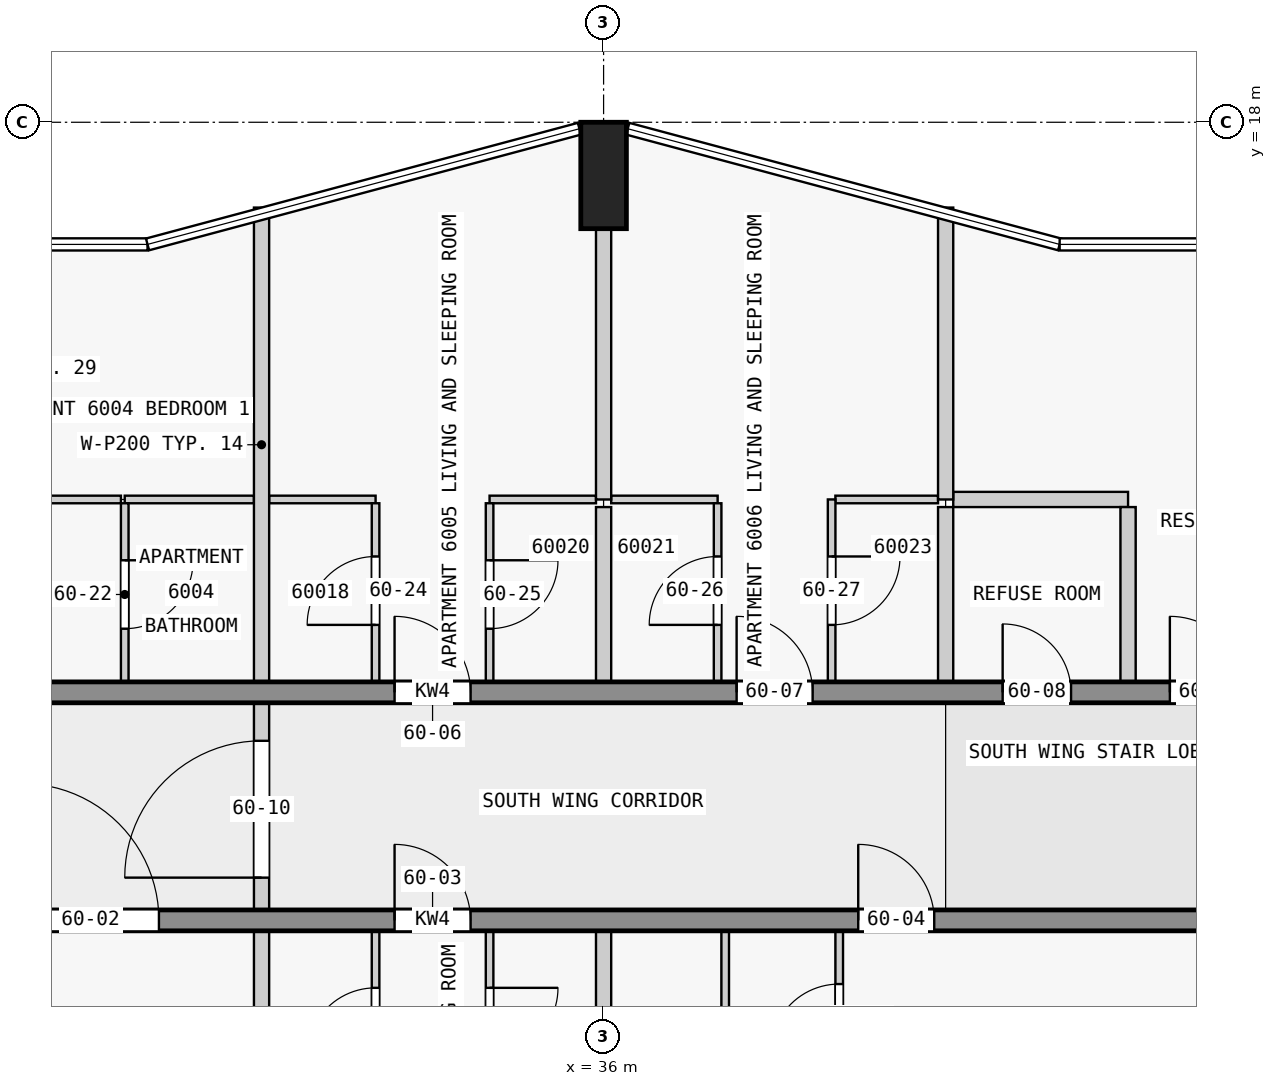
"""IFC4 building model, lengths in metres.
Left out: names, types, materials, properties, quantities, classifications, styles, units other than length and angle.
Written with IfcOpenShell. Run it as: python <this file> out.ifc"""

import sys

from ifc_helpers import new_model, si_unit, direction, frame, frame_2d, origin, origin_2d, place, context, subcontext, project, spatial, rectangle, extrude, element, fill, save


model = new_model("IFC4")
c1 = context("Model", 3, precision=1e-05, world=origin(), true_north=direction((0.0, 1.0)))
c2 = subcontext(c1, "Body", "Model", "MODEL_VIEW")
j1 = project(units=[si_unit("LENGTHUNIT", "METRE"), si_unit("PLANEANGLEUNIT", "RADIAN")], contexts=[c1])
p1 = place(None, origin())
s1 = spatial("IfcSite", under=j1, at=p1, CompositionType="ELEMENT")
p2 = place(p1, origin())
s2 = spatial("IfcBuilding", under=s1, at=p2, CompositionType="ELEMENT")
p3 = place(p2, frame((0.0, 0.0, 229.4)))
s3 = spatial("IfcBuildingStorey", under=s2, at=p3, CompositionType="ELEMENT", Elevation=229.4)
p4 = place(p3, frame((36.0, 17.3, 0.0), z_axis=(0.0, 0.0, 1.0), x_axis=(1.0, 0.0, 0.0)))
e1 = element("IfcColumn", 1, at=p4, inside=s3, PredefinedType="COLUMN", context=c2, shape_type="SweptSolid", body=[
    extrude(rectangle(XDim=0.6, YDim=1.4, at=origin_2d()), origin(), (0.0, 0.0, 1.0), 3.5),
])
p5 = place(p3, frame((22.5, 7.5, 0.0), z_axis=(0.0, 0.0, 1.0), x_axis=(1.0, 0.0, 0.0)))
e2 = element("IfcWall", 2, at=p5, inside=s3, PredefinedType="SHEAR", context=c2, shape_type="SweptSolid", body=[
    extrude(rectangle(XDim=22.5, YDim=0.275, at=frame_2d((11.25, 0.0))), origin(), (0.0, 0.0, 1.0), 3.25),
])
p6 = place(p5, frame((1.75, 0.0, 0.0)))
e3 = element("IfcOpeningElement", 3, at=p6, cuts=e2, PredefinedType="OPENING", context=c2, shape_type="SweptSolid", body=[
    extrude(rectangle(XDim=1.0, YDim=2.1, at=frame_2d((0.5, 1.05))), frame((0.0, 0.147, 0.0), z_axis=(0.0, -1.0, 0.0), x_axis=(1.0, 0.0, 0.0)), (0.0, 0.0, 1.0), 0.295),
])
p7 = place(p5, frame((5.85, 0.0, 0.0)))
e4 = element("IfcOpeningElement", 4, at=p7, cuts=e2, PredefinedType="OPENING", context=c2, shape_type="SweptSolid", body=[
    extrude(rectangle(XDim=1.8, YDim=2.1, at=frame_2d((0.9, 1.05))), frame((0.0, 0.147, 0.0), z_axis=(0.0, -1.0, 0.0), x_axis=(1.0, 0.0, 0.0)), (0.0, 0.0, 1.0), 0.295),
])
p8 = place(p5, frame((10.75, 0.0, 0.0)))
e5 = element("IfcOpeningElement", 5, at=p8, cuts=e2, PredefinedType="OPENING", context=c2, shape_type="SweptSolid", body=[
    extrude(rectangle(XDim=1.0, YDim=2.1, at=frame_2d((0.5, 1.05))), frame((0.0, 0.147, 0.0), z_axis=(0.0, -1.0, 0.0), x_axis=(1.0, 0.0, 0.0)), (0.0, 0.0, 1.0), 0.295),
])
p9 = place(p5, frame((16.85, 0.0, 0.0)))
e6 = element("IfcOpeningElement", 6, at=p9, cuts=e2, PredefinedType="OPENING", context=c2, shape_type="SweptSolid", body=[
    extrude(rectangle(XDim=1.0, YDim=2.1, at=frame_2d((0.5, 1.05))), frame((0.0, 0.147, 0.0), z_axis=(0.0, -1.0, 0.0), x_axis=(1.0, 0.0, 0.0)), (0.0, 0.0, 1.0), 0.295),
])
p10 = place(p3, frame((22.5, 10.5, 0.0), z_axis=(0.0, 0.0, 1.0), x_axis=(1.0, 0.0, 0.0)))
e7 = element("IfcWall", 7, at=p10, inside=s3, PredefinedType="SHEAR", context=c2, shape_type="SweptSolid", body=[
    extrude(rectangle(XDim=22.5, YDim=0.275, at=frame_2d((11.25, 0.0))), origin(), (0.0, 0.0, 1.0), 3.25),
])
p11 = place(p10, frame((4.05, 0.0, 0.0)))
e8 = element("IfcOpeningElement", 8, at=p11, cuts=e7, PredefinedType="OPENING", context=c2, shape_type="SweptSolid", body=[
    extrude(rectangle(XDim=1.0, YDim=2.1, at=frame_2d((0.5, 1.05))), frame((0.0, 0.147, 0.0), z_axis=(0.0, -1.0, 0.0), x_axis=(1.0, 0.0, 0.0)), (0.0, 0.0, 1.0), 0.295),
])
p12 = place(p10, frame((10.75, 0.0, 0.0)))
e9 = element("IfcOpeningElement", 9, at=p12, cuts=e7, PredefinedType="OPENING", context=c2, shape_type="SweptSolid", body=[
    extrude(rectangle(XDim=1.0, YDim=2.1, at=frame_2d((0.5, 1.05))), frame((0.0, 0.147, 0.0), z_axis=(0.0, -1.0, 0.0), x_axis=(1.0, 0.0, 0.0)), (0.0, 0.0, 1.0), 0.295),
])
p13 = place(p10, frame((15.25, 0.0, 0.0)))
e10 = element("IfcOpeningElement", 10, at=p13, cuts=e7, PredefinedType="OPENING", context=c2, shape_type="SweptSolid", body=[
    extrude(rectangle(XDim=1.0, YDim=2.1, at=frame_2d((0.5, 1.05))), frame((0.0, 0.147, 0.0), z_axis=(0.0, -1.0, 0.0), x_axis=(1.0, 0.0, 0.0)), (0.0, 0.0, 1.0), 0.295),
])
p14 = place(p10, frame((18.75, 0.0, 0.0)))
e11 = element("IfcOpeningElement", 11, at=p14, cuts=e7, PredefinedType="OPENING", context=c2, shape_type="SweptSolid", body=[
    extrude(rectangle(XDim=0.9, YDim=2.1, at=frame_2d((0.45, 1.05))), frame((0.0, 0.147, 0.0), z_axis=(0.0, -1.0, 0.0), x_axis=(1.0, 0.0, 0.0)), (0.0, 0.0, 1.0), 0.295),
])
p15 = place(p10, frame((20.95, 0.0, 0.0)))
e12 = element("IfcOpeningElement", 12, at=p15, cuts=e7, PredefinedType="OPENING", context=c2, shape_type="SweptSolid", body=[
    extrude(rectangle(XDim=1.0, YDim=2.1, at=frame_2d((0.5, 1.05))), frame((0.0, 0.147, 0.0), z_axis=(0.0, -1.0, 0.0), x_axis=(1.0, 0.0, 0.0)), (0.0, 0.0, 1.0), 0.295),
])
p16 = place(p3, frame((31.4, 13.038, 0.0), z_axis=(0.0, 0.0, 1.0), x_axis=(-1.0, 0.0, 0.0)))
e13 = element("IfcWall", 13, at=p16, inside=s3, PredefinedType="PARTITIONING", context=c2, shape_type="SweptSolid", body=[
    extrude(rectangle(XDim=1.7, YDim=0.1, at=frame_2d((0.85, 0.0))), origin(), (0.0, 0.0, 1.0), 3.25),
])
for number, where, z_axis, x_axis in (
    (14, (33.0, 13.038, 0.0), (0.0, 0.0, 1.0), (-1.0, 0.0, 0.0)),
    (15, (35.9, 13.038, 0.0), (0.0, 0.0, 1.0), (-1.0, 0.0, 0.0)),
    (16, (37.5, 13.038, 0.0), (0.0, 0.0, 1.0), (-1.0, 0.0, 0.0)),
):
    element("IfcWall", number, at=place(p3, frame(where, z_axis=z_axis, x_axis=x_axis)), inside=s3, PredefinedType="PARTITIONING", context=c2, shape_type="SweptSolid", body=[
        extrude(rectangle(XDim=1.4, YDim=0.1, at=frame_2d((0.7, 0.0))), origin(), (0.0, 0.0, 1.0), 3.25),
    ])
p17 = place(p3, frame((40.4, 13.038, 0.0), z_axis=(0.0, 0.0, 1.0), x_axis=(-1.0, 0.0, 0.0)))
e17 = element("IfcWall", 17, at=p17, inside=s3, PredefinedType="PARTITIONING", context=c2, shape_type="SweptSolid", body=[
    extrude(rectangle(XDim=1.35, YDim=0.1, at=frame_2d((0.675, 0.0))), origin(), (0.0, 0.0, 1.0), 3.25),
])
p18 = place(p3, frame((27.05, 13.038, 0.0), z_axis=(0.0, 0.0, 1.0), x_axis=(1.0, 0.0, 0.0)))
e18 = element("IfcWall", 18, at=p18, inside=s3, PredefinedType="PARTITIONING", context=c2, shape_type="SweptSolid", body=[
    extrude(rectangle(XDim=2.6, YDim=0.1, at=frame_2d((1.3, 0.0))), origin(), (0.0, 0.0, 1.0), 3.25),
])
p19 = place(p3, frame((42.9, 13.038, 0.0), z_axis=(0.0, 0.0, 1.0), x_axis=(-1.0, 0.0, 0.0)))
e19 = element("IfcWall", 19, at=p19, inside=s3, PredefinedType="PARTITIONING", context=c2, shape_type="SweptSolid", body=[
    extrude(rectangle(XDim=2.3, YDim=0.2, at=frame_2d((1.15, 0.0))), origin(), (0.0, 0.0, 1.0), 3.25),
])
p20 = place(p3, frame((29.7, 12.988, 0.0), z_axis=(0.0, 0.0, 1.0), x_axis=(0.0, -1.0, 0.0)))
e20 = element("IfcWall", 20, at=p20, inside=s3, PredefinedType="PARTITIONING", context=c2, shape_type="SweptSolid", body=[
    extrude(rectangle(XDim=2.35, YDim=0.1, at=frame_2d((1.175, 0.0))), origin(), (0.0, 0.0, 1.0), 3.25),
])
p21 = place(p20, frame((0.75, 0.0, 0.0)))
e21 = element("IfcOpeningElement", 21, at=p21, cuts=e20, PredefinedType="OPENING", context=c2, shape_type="SweptSolid", body=[
    extrude(rectangle(XDim=0.9, YDim=2.1, at=frame_2d((0.45, 1.05))), frame((0.0, 0.06, 0.0), z_axis=(0.0, -1.0, 0.0), x_axis=(1.0, 0.0, 0.0)), (0.0, 0.0, 1.0), 0.12),
])
for number, where, z_axis, x_axis in (
    (22, (31.5, 1.122, 0.0), (0.0, 0.0, 1.0), (0.0, 1.0, 0.0)),
    (23, (31.5, 10.637, 0.0), (0.0, 0.0, 1.0), (0.0, 1.0, 0.0)),
):
    element("IfcWall", number, at=place(p3, frame(where, z_axis=z_axis, x_axis=x_axis)), inside=s3, PredefinedType="PARTITIONING", context=c2, shape_type="SweptSolid", body=[
        extrude(rectangle(XDim=6.24, YDim=0.2, at=frame_2d((3.12, 0.0))), origin(), (0.0, 0.0, 1.0), 3.25),
    ])
p22 = place(p3, frame((33.0, 4.962, 0.0), z_axis=(0.0, 0.0, 1.0), x_axis=(0.0, 1.0, 0.0)))
e24 = element("IfcWall", 24, at=p22, inside=s3, PredefinedType="PARTITIONING", context=c2, shape_type="SweptSolid", body=[
    extrude(rectangle(XDim=2.4, YDim=0.1, at=frame_2d((1.2, 0.0))), origin(), (0.0, 0.0, 1.0), 3.25),
])
p23 = place(p22, frame((0.75, 0.0, 0.0)))
e25 = element("IfcOpeningElement", 25, at=p23, cuts=e24, PredefinedType="OPENING", context=c2, shape_type="SweptSolid", body=[
    extrude(rectangle(XDim=0.9, YDim=2.1, at=frame_2d((0.45, 1.05))), frame((0.0, 0.06, 0.0), z_axis=(0.0, -1.0, 0.0), x_axis=(1.0, 0.0, 0.0)), (0.0, 0.0, 1.0), 0.12),
])
p24 = place(p3, frame((33.0, 10.637, 0.0), z_axis=(0.0, 0.0, 1.0), x_axis=(0.0, 1.0, 0.0)))
e26 = element("IfcWall", 26, at=p24, inside=s3, PredefinedType="PARTITIONING", context=c2, shape_type="SweptSolid", body=[
    extrude(rectangle(XDim=2.35, YDim=0.1, at=frame_2d((1.175, 0.0))), origin(), (0.0, 0.0, 1.0), 3.25),
])
p25 = place(p24, frame((0.75, 0.0, 0.0)))
e27 = element("IfcOpeningElement", 27, at=p25, cuts=e26, PredefinedType="OPENING", context=c2, shape_type="SweptSolid", body=[
    extrude(rectangle(XDim=0.9, YDim=2.1, at=frame_2d((0.45, 1.05))), frame((0.0, 0.06, 0.0), z_axis=(0.0, -1.0, 0.0), x_axis=(1.0, 0.0, 0.0)), (0.0, 0.0, 1.0), 0.12),
])
p26 = place(p3, frame((34.5, 7.363, 0.0), z_axis=(0.0, 0.0, 1.0), x_axis=(0.0, -1.0, 0.0)))
e28 = element("IfcWall", 28, at=p26, inside=s3, PredefinedType="PARTITIONING", context=c2, shape_type="SweptSolid", body=[
    extrude(rectangle(XDim=2.35, YDim=0.1, at=frame_2d((1.175, 0.0))), origin(), (0.0, 0.0, 1.0), 3.25),
])
p27 = place(p26, frame((0.75, 0.0, 0.0)))
e29 = element("IfcOpeningElement", 29, at=p27, cuts=e28, PredefinedType="OPENING", context=c2, shape_type="SweptSolid", body=[
    extrude(rectangle(XDim=0.9, YDim=2.1, at=frame_2d((0.45, 1.05))), frame((0.0, 0.06, 0.0), z_axis=(0.0, -1.0, 0.0), x_axis=(1.0, 0.0, 0.0)), (0.0, 0.0, 1.0), 0.12),
])
p28 = place(p3, frame((34.5, 12.988, 0.0), z_axis=(0.0, 0.0, 1.0), x_axis=(0.0, -1.0, 0.0)))
e30 = element("IfcWall", 30, at=p28, inside=s3, PredefinedType="PARTITIONING", context=c2, shape_type="SweptSolid", body=[
    extrude(rectangle(XDim=2.35, YDim=0.1, at=frame_2d((1.175, 0.0))), origin(), (0.0, 0.0, 1.0), 3.25),
])
p29 = place(p28, frame((0.75, 0.0, 0.0)))
e31 = element("IfcOpeningElement", 31, at=p29, cuts=e30, PredefinedType="OPENING", context=c2, shape_type="SweptSolid", body=[
    extrude(rectangle(XDim=0.9, YDim=2.1, at=frame_2d((0.45, 1.05))), frame((0.0, 0.06, 0.0), z_axis=(0.0, -1.0, 0.0), x_axis=(1.0, 0.0, 0.0)), (0.0, 0.0, 1.0), 0.12),
])
p30 = place(p3, frame((36.0, 16.6, 0.0), z_axis=(0.0, 0.0, 1.0), x_axis=(0.0, -1.0, 0.0)))
e32 = element("IfcWall", 32, at=p30, inside=s3, PredefinedType="PARTITIONING", context=c2, shape_type="SweptSolid", body=[
    extrude(rectangle(XDim=3.562, YDim=0.2, at=frame_2d((1.781, 0.0))), origin(), (0.0, 0.0, 1.0), 3.25),
])
for number, where, z_axis, x_axis in (
    (33, (36.0, 5.062, 0.0), (0.0, 0.0, 1.0), (0.0, 1.0, 0.0)),
    (34, (36.0, 10.637, 0.0), (0.0, 0.0, 1.0), (0.0, 1.0, 0.0)),
):
    element("IfcWall", number, at=place(p3, frame(where, z_axis=z_axis, x_axis=x_axis)), inside=s3, PredefinedType="PARTITIONING", context=c2, shape_type="SweptSolid", body=[
        extrude(rectangle(XDim=2.3, YDim=0.2, at=frame_2d((1.15, 0.0))), origin(), (0.0, 0.0, 1.0), 3.25),
    ])
p31 = place(p3, frame((37.5, 10.637, 0.0), z_axis=(0.0, 0.0, 1.0), x_axis=(0.0, 1.0, 0.0)))
e35 = element("IfcWall", 35, at=p31, inside=s3, PredefinedType="PARTITIONING", context=c2, shape_type="SweptSolid", body=[
    extrude(rectangle(XDim=2.35, YDim=0.1, at=frame_2d((1.175, 0.0))), origin(), (0.0, 0.0, 1.0), 3.25),
])
p32 = place(p31, frame((0.75, 0.0, 0.0)))
e36 = element("IfcOpeningElement", 36, at=p32, cuts=e35, PredefinedType="OPENING", context=c2, shape_type="SweptSolid", body=[
    extrude(rectangle(XDim=0.9, YDim=2.1, at=frame_2d((0.45, 1.05))), frame((0.0, 0.06, 0.0), z_axis=(0.0, -1.0, 0.0), x_axis=(1.0, 0.0, 0.0)), (0.0, 0.0, 1.0), 0.12),
])
p33 = place(p3, frame((37.6, 5.012, 0.0), z_axis=(0.0, 0.0, 1.0), x_axis=(0.0, 1.0, 0.0)))
e37 = element("IfcWall", 37, at=p33, inside=s3, PredefinedType="PARTITIONING", context=c2, shape_type="SweptSolid", body=[
    extrude(rectangle(XDim=2.35, YDim=0.1, at=frame_2d((1.175, 0.0))), origin(), (0.0, 0.0, 1.0), 3.25),
])
p34 = place(p3, frame((39.0, 13.038, 0.0), z_axis=(0.0, 0.0, 1.0), x_axis=(0.0, -1.0, 0.0)))
e38 = element("IfcWall", 38, at=p34, inside=s3, PredefinedType="PARTITIONING", context=c2, shape_type="SweptSolid", body=[
    extrude(rectangle(XDim=2.4, YDim=0.1, at=frame_2d((1.2, 0.0))), origin(), (0.0, 0.0, 1.0), 3.25),
])
p35 = place(p34, frame((0.75, 0.0, 0.0)))
e39 = element("IfcOpeningElement", 39, at=p35, cuts=e38, PredefinedType="OPENING", context=c2, shape_type="SweptSolid", body=[
    extrude(rectangle(XDim=0.9, YDim=2.1, at=frame_2d((0.45, 1.05))), frame((0.0, 0.06, 0.0), z_axis=(0.0, -1.0, 0.0), x_axis=(1.0, 0.0, 0.0)), (0.0, 0.0, 1.0), 0.12),
])
p36 = place(p3, frame((39.1, 5.012, 0.0), z_axis=(0.0, 0.0, 1.0), x_axis=(0.0, 1.0, 0.0)))
e40 = element("IfcWall", 40, at=p36, inside=s3, PredefinedType="PARTITIONING", context=c2, shape_type="SweptSolid", body=[
    extrude(rectangle(XDim=2.35, YDim=0.1, at=frame_2d((1.175, 0.0))), origin(), (0.0, 0.0, 1.0), 3.25),
])
p37 = place(p36, frame((0.75, 0.0, 0.0)))
e41 = element("IfcOpeningElement", 41, at=p37, cuts=e40, PredefinedType="OPENING", context=c2, shape_type="SweptSolid", body=[
    extrude(rectangle(XDim=0.9, YDim=2.1, at=frame_2d((0.45, 1.05))), frame((0.0, 0.06, 0.0), z_axis=(0.0, -1.0, 0.0), x_axis=(1.0, 0.0, 0.0)), (0.0, 0.0, 1.0), 0.12),
])
p38 = place(p3, frame((40.5, 16.878, 0.0), z_axis=(0.0, 0.0, 1.0), x_axis=(0.0, -1.0, 0.0)))
e42 = element("IfcWall", 42, at=p38, inside=s3, PredefinedType="PARTITIONING", context=c2, shape_type="SweptSolid", body=[
    extrude(rectangle(XDim=3.84, YDim=0.2, at=frame_2d((1.92, 0.0))), origin(), (0.0, 0.0, 1.0), 3.25),
])
for number, where, z_axis, x_axis in (
    (43, (40.5, 10.637, 0.0), (0.0, 0.0, 1.0), (0.0, 1.0, 0.0)),
    (44, (42.9, 10.637, 0.0), (0.0, 0.0, 1.0), (0.0, 1.0, 0.0)),
):
    element("IfcWall", number, at=place(p3, frame(where, z_axis=z_axis, x_axis=x_axis)), inside=s3, PredefinedType="PARTITIONING", context=c2, shape_type="SweptSolid", body=[
        extrude(rectangle(XDim=2.3, YDim=0.2, at=frame_2d((1.15, 0.0))), origin(), (0.0, 0.0, 1.0), 3.25),
    ])
p39 = place(p3, frame((31.5, 7.462, 0.0), z_axis=(0.0, 0.0, 1.0), x_axis=(0.0, 1.0, 0.0)))
e45 = element("IfcWall", 45, at=p39, inside=s3, PredefinedType="PARTITIONING", context=c2, shape_type="SweptSolid", body=[
    extrude(rectangle(XDim=3.075, YDim=0.2, at=frame_2d((1.538, 0.0))), origin(), (0.0, 0.0, 1.0), 3.25),
])
p40 = place(p39, frame((0.6, 0.0, 0.0)))
e46 = element("IfcOpeningElement", 46, at=p40, cuts=e45, PredefinedType="OPENING", context=c2, shape_type="SweptSolid", body=[
    extrude(rectangle(XDim=1.8, YDim=2.1, at=frame_2d((0.9, 1.05))), frame((0.0, 0.11, 0.0), z_axis=(0.0, -1.0, 0.0), x_axis=(1.0, 0.0, 0.0)), (0.0, 0.0, 1.0), 0.22),
])
p41 = place(p7, origin())
e47 = element("IfcDoor", 47, at=p41, inside=s3, OperationType="SINGLE_SWING_LEFT", PredefinedType="DOOR", context=c2, shape_type="SweptSolid", body=[
    extrude(rectangle(XDim=1.8, YDim=2.1, at=frame_2d((0.9, 1.05))), frame((0.0, 0.025, 0.0), z_axis=(0.0, -1.0, 0.0), x_axis=(1.0, 0.0, 0.0)), (0.0, 0.0, 1.0), 0.05),
])
fill(e4, e47)
p42 = place(p8, origin())
e48 = element("IfcDoor", 48, at=p42, inside=s3, OperationType="SINGLE_SWING_LEFT", PredefinedType="DOOR", context=c2, shape_type="SweptSolid", body=[
    extrude(rectangle(XDim=1.0, YDim=2.1, at=frame_2d((0.5, 1.05))), frame((0.0, 0.025, 0.0), z_axis=(0.0, -1.0, 0.0), x_axis=(1.0, 0.0, 0.0)), (0.0, 0.0, 1.0), 0.05),
])
fill(e5, e48)
p43 = place(p9, origin())
e49 = element("IfcDoor", 49, at=p43, inside=s3, OperationType="SINGLE_SWING_RIGHT", PredefinedType="DOOR", context=c2, shape_type="SweptSolid", body=[
    extrude(rectangle(XDim=1.0, YDim=2.1, at=frame_2d((0.5, 1.05))), frame((0.0, 0.025, 0.0), z_axis=(0.0, -1.0, 0.0), x_axis=(1.0, 0.0, 0.0)), (0.0, 0.0, 1.0), 0.05),
])
fill(e6, e49)
p44 = place(p12, origin())
e50 = element("IfcDoor", 50, at=p44, inside=s3, OperationType="SINGLE_SWING_LEFT", PredefinedType="DOOR", context=c2, shape_type="SweptSolid", body=[
    extrude(rectangle(XDim=1.0, YDim=2.1, at=frame_2d((0.5, 1.05))), frame((0.0, 0.025, 0.0), z_axis=(0.0, -1.0, 0.0), x_axis=(1.0, 0.0, 0.0)), (0.0, 0.0, 1.0), 0.05),
])
fill(e9, e50)
p45 = place(p13, origin())
e51 = element("IfcDoor", 51, at=p45, inside=s3, OperationType="SINGLE_SWING_RIGHT", PredefinedType="DOOR", context=c2, shape_type="SweptSolid", body=[
    extrude(rectangle(XDim=1.0, YDim=2.1, at=frame_2d((0.5, 1.05))), frame((0.0, 0.025, 0.0), z_axis=(0.0, -1.0, 0.0), x_axis=(1.0, 0.0, 0.0)), (0.0, 0.0, 1.0), 0.05),
])
fill(e10, e51)
p46 = place(p14, origin())
e52 = element("IfcDoor", 52, at=p46, inside=s3, OperationType="SINGLE_SWING_RIGHT", PredefinedType="DOOR", context=c2, shape_type="SweptSolid", body=[
    extrude(rectangle(XDim=0.9, YDim=2.1, at=frame_2d((0.45, 1.05))), frame((0.0, 0.025, 0.0), z_axis=(0.0, -1.0, 0.0), x_axis=(1.0, 0.0, 0.0)), (0.0, 0.0, 1.0), 0.05),
])
fill(e11, e52)
p47 = place(p15, origin())
e53 = element("IfcDoor", 53, at=p47, inside=s3, OperationType="SINGLE_SWING_RIGHT", PredefinedType="DOOR", context=c2, shape_type="SweptSolid", body=[
    extrude(rectangle(XDim=1.0, YDim=2.1, at=frame_2d((0.5, 1.05))), frame((0.0, 0.025, 0.0), z_axis=(0.0, -1.0, 0.0), x_axis=(1.0, 0.0, 0.0)), (0.0, 0.0, 1.0), 0.05),
])
fill(e12, e53)
p48 = place(p40, origin())
e54 = element("IfcDoor", 54, at=p48, inside=s3, OperationType="SINGLE_SWING_LEFT", PredefinedType="DOOR", context=c2, shape_type="SweptSolid", body=[
    extrude(rectangle(XDim=1.8, YDim=2.1, at=frame_2d((0.9, 1.05))), frame((0.0, 0.025, 0.0), z_axis=(0.0, -1.0, 0.0), x_axis=(1.0, 0.0, 0.0)), (0.0, 0.0, 1.0), 0.05),
])
fill(e46, e54)
p49 = place(p23, origin())
e55 = element("IfcDoor", 55, at=p49, inside=s3, OperationType="SINGLE_SWING_RIGHT", PredefinedType="DOOR", context=c2, shape_type="SweptSolid", body=[
    extrude(rectangle(XDim=0.9, YDim=2.1, at=frame_2d((0.45, 1.05))), frame((0.0, 0.025, 0.0), z_axis=(0.0, -1.0, 0.0), x_axis=(1.0, 0.0, 0.0)), (0.0, 0.0, 1.0), 0.05),
])
fill(e25, e55)
p50 = place(p27, origin())
e56 = element("IfcDoor", 56, at=p50, inside=s3, OperationType="SINGLE_SWING_RIGHT", PredefinedType="DOOR", context=c2, shape_type="SweptSolid", body=[
    extrude(rectangle(XDim=0.9, YDim=2.1, at=frame_2d((0.45, 1.05))), frame((0.0, 0.025, 0.0), z_axis=(0.0, -1.0, 0.0), x_axis=(1.0, 0.0, 0.0)), (0.0, 0.0, 1.0), 0.05),
])
fill(e29, e56)
p51 = place(p37, origin())
e57 = element("IfcDoor", 57, at=p51, inside=s3, OperationType="SINGLE_SWING_RIGHT", PredefinedType="DOOR", context=c2, shape_type="SweptSolid", body=[
    extrude(rectangle(XDim=0.9, YDim=2.1, at=frame_2d((0.45, 1.05))), frame((0.0, 0.025, 0.0), z_axis=(0.0, -1.0, 0.0), x_axis=(1.0, 0.0, 0.0)), (0.0, 0.0, 1.0), 0.05),
])
fill(e41, e57)
p52 = place(p21, origin())
e58 = element("IfcDoor", 58, at=p52, inside=s3, OperationType="SINGLE_SWING_RIGHT", PredefinedType="DOOR", context=c2, shape_type="SweptSolid", body=[
    extrude(rectangle(XDim=0.9, YDim=2.1, at=frame_2d((0.45, 1.05))), frame((0.0, 0.025, 0.0), z_axis=(0.0, -1.0, 0.0), x_axis=(1.0, 0.0, 0.0)), (0.0, 0.0, 1.0), 0.05),
])
fill(e21, e58)
p53 = place(p25, origin())
e59 = element("IfcDoor", 59, at=p53, inside=s3, OperationType="SINGLE_SWING_RIGHT", PredefinedType="DOOR", context=c2, shape_type="SweptSolid", body=[
    extrude(rectangle(XDim=0.9, YDim=2.1, at=frame_2d((0.45, 1.05))), frame((0.0, 0.025, 0.0), z_axis=(0.0, -1.0, 0.0), x_axis=(1.0, 0.0, 0.0)), (0.0, 0.0, 1.0), 0.05),
])
fill(e27, e59)
p54 = place(p29, origin())
e60 = element("IfcDoor", 60, at=p54, inside=s3, OperationType="SINGLE_SWING_RIGHT", PredefinedType="DOOR", context=c2, shape_type="SweptSolid", body=[
    extrude(rectangle(XDim=0.9, YDim=2.1, at=frame_2d((0.45, 1.05))), frame((0.0, 0.025, 0.0), z_axis=(0.0, -1.0, 0.0), x_axis=(1.0, 0.0, 0.0)), (0.0, 0.0, 1.0), 0.05),
])
fill(e31, e60)
p55 = place(p32, origin())
e61 = element("IfcDoor", 61, at=p55, inside=s3, OperationType="SINGLE_SWING_RIGHT", PredefinedType="DOOR", context=c2, shape_type="SweptSolid", body=[
    extrude(rectangle(XDim=0.9, YDim=2.1, at=frame_2d((0.45, 1.05))), frame((0.0, 0.025, 0.0), z_axis=(0.0, -1.0, 0.0), x_axis=(1.0, 0.0, 0.0)), (0.0, 0.0, 1.0), 0.05),
])
fill(e36, e61)
p56 = place(p35, origin())
e62 = element("IfcDoor", 62, at=p56, inside=s3, OperationType="SINGLE_SWING_LEFT", PredefinedType="DOOR", context=c2, shape_type="SweptSolid", body=[
    extrude(rectangle(XDim=0.9, YDim=2.1, at=frame_2d((0.45, 1.05))), frame((0.0, 0.025, 0.0), z_axis=(0.0, -1.0, 0.0), x_axis=(1.0, 0.0, 0.0)), (0.0, 0.0, 1.0), 0.05),
])
fill(e39, e62)
save(model, sys.argv[1])
